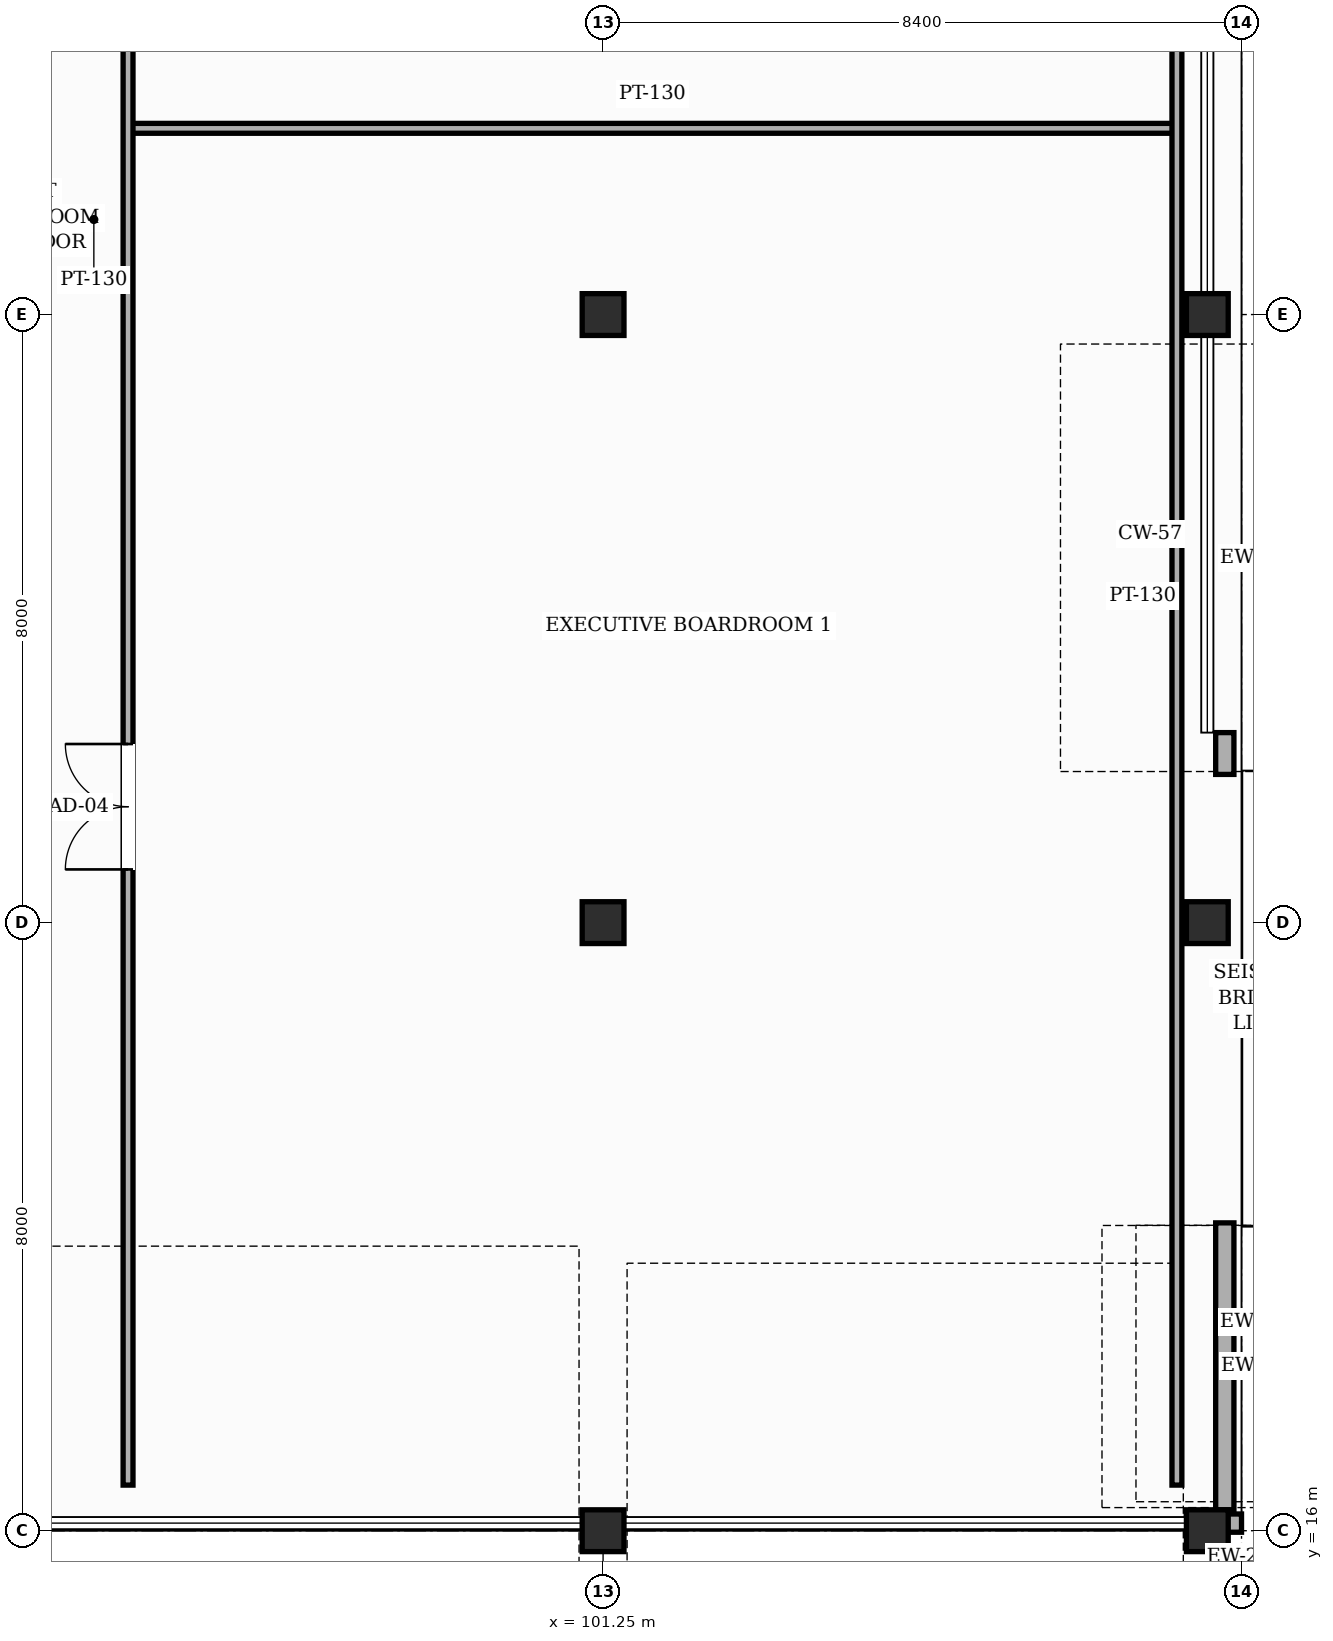
"""IFC4 building model, lengths in metres.
Left out: names, types, materials, properties, quantities, classifications, styles, units other than length and angle.
Written with IfcOpenShell. Run it as: python <this file> out.ifc"""

import sys

from ifc_helpers import new_model, si_unit, direction, frame, frame_2d, origin, origin_2d, place, context, subcontext, project, spatial, rectangle, hollow_rectangle, extrude, element, fill, save


model = new_model("IFC4")
c1 = context("Model", 3, precision=1e-05, world=origin(), true_north=direction((0.0, 1.0)))
c2 = subcontext(c1, "Body", "Model", "MODEL_VIEW")
j1 = project(units=[si_unit("LENGTHUNIT", "METRE"), si_unit("PLANEANGLEUNIT", "RADIAN")], contexts=[c1])
p1 = place(None, origin())
s1 = spatial("IfcSite", under=j1, at=p1, CompositionType="ELEMENT")
p2 = place(p1, origin())
s2 = spatial("IfcBuilding", under=s1, at=p2, CompositionType="ELEMENT")
p3 = place(p2, frame((0.0, 0.0, 10.2)))
s3 = spatial("IfcBuildingStorey", under=s2, at=p3, CompositionType="ELEMENT", Elevation=10.2)
for number, where, z_axis, x_axis in (
    (1, (101.25, 16.0, 0.0), (0.0, 0.0, 1.0), (1.0, 0.0, 0.0)),
    (2, (101.25, 24.0, 0.0), (0.0, 0.0, 1.0), (1.0, 0.0, 0.0)),
    (3, (101.25, 32.0, 0.0), (0.0, 0.0, 1.0), (1.0, 0.0, 0.0)),
):
    element("IfcColumn", number, at=place(p3, frame(where, z_axis=z_axis, x_axis=x_axis)), inside=s3, PredefinedType="COLUMN", context=c2, shape_type="SweptSolid", body=[
        extrude(hollow_rectangle(XDim=0.55, YDim=0.55, WallThickness=0.022, InnerFilletRadius=0.022, OuterFilletRadius=0.044, at=origin_2d()), origin(), (0.0, 0.0, 1.0), 4.8),
    ])
for number, where, z_axis, x_axis in (
    (4, (109.2, 16.0, 0.0), (0.0, 0.0, 1.0), (1.0, 0.0, 0.0)),
    (5, (109.2, 24.0, 0.0), (0.0, 0.0, 1.0), (1.0, 0.0, 0.0)),
    (6, (109.2, 32.0, 0.0), (0.0, 0.0, 1.0), (1.0, 0.0, 0.0)),
):
    element("IfcColumn", number, at=place(p3, frame(where, z_axis=z_axis, x_axis=x_axis)), inside=s3, PredefinedType="COLUMN", context=c2, shape_type="SweptSolid", body=[
        extrude(hollow_rectangle(XDim=0.55, YDim=0.55, WallThickness=0.022, InnerFilletRadius=0.022, OuterFilletRadius=0.044, at=origin_2d()), origin(), (0.0, 0.0, 1.0), 4.56),
    ])
p4 = place(p3, frame((109.65, 16.1, 0.0), z_axis=(0.0, 0.0, 1.0), x_axis=(-1.0, 0.0, 0.0)))
e7 = element("IfcWall", 7, at=p4, inside=s3, PredefinedType="SOLIDWALL", context=c2, shape_type="SweptSolid", body=[
    extrude(rectangle(XDim=0.725, YDim=0.24, at=frame_2d((0.362, 0.0))), origin(), (0.0, 0.0, 1.0), 4.545),
])
p5 = place(p3, frame((109.43, 20.05, 0.0), z_axis=(0.0, 0.0, 1.0), x_axis=(0.0, -1.0, 0.0)))
e8 = element("IfcWall", 8, at=p5, inside=s3, PredefinedType="SOLIDWALL", context=c2, shape_type="SweptSolid", body=[
    extrude(rectangle(XDim=3.775, YDim=0.24, at=frame_2d((1.888, 0.0))), origin(), (0.0, 0.0, 1.0), 3.885),
])
p6 = place(p3, frame((109.43, 26.5, 0.0), z_axis=(0.0, 0.0, 1.0), x_axis=(0.0, -1.0, 0.0)))
e9 = element("IfcWall", 9, at=p6, inside=s3, PredefinedType="SOLIDWALL", context=c2, shape_type="SweptSolid", body=[
    extrude(rectangle(XDim=0.55, YDim=0.24, at=frame_2d((0.275, 0.0))), origin(), (0.0, 0.0, 1.0), 3.885),
])
p7 = place(p3, frame((95.0, 34.45, 0.0), z_axis=(0.0, 0.0, 1.0), x_axis=(1.0, 0.0, 0.0)))
e10 = element("IfcWall", 10, at=p7, inside=s3, PredefinedType="PARTITIONING", context=c2, shape_type="SweptSolid", body=[
    extrude(rectangle(XDim=13.8, YDim=0.13, at=frame_2d((6.9, 0.0))), origin(), (0.0, 0.0, 1.0), 4.545),
])
p8 = place(p3, frame((95.0, 16.6, 0.0), z_axis=(0.0, 0.0, 1.0), x_axis=(0.0, 1.0, 0.0)))
e11 = element("IfcWall", 11, at=p8, inside=s3, PredefinedType="PARTITIONING", context=c2, shape_type="SweptSolid", body=[
    extrude(rectangle(XDim=35.7, YDim=0.13, at=frame_2d((17.85, 0.0))), origin(), (0.0, 0.0, 1.0), 4.545),
])
p9 = place(p8, frame((8.1, 0.0, 0.0)))
e12 = element("IfcOpeningElement", 12, at=p9, cuts=e11, PredefinedType="OPENING", context=c2, shape_type="SweptSolid", body=[
    extrude(rectangle(XDim=1.65, YDim=2.35, at=frame_2d((0.825, 1.175))), frame((0.0, 0.075, 0.0), z_axis=(0.0, -1.0, 0.0), x_axis=(1.0, 0.0, 0.0)), (0.0, 0.0, 1.0), 0.15),
])
p10 = place(p8, frame((26.025, 0.0, 0.0)))
e13 = element("IfcOpeningElement", 13, at=p10, cuts=e11, PredefinedType="OPENING", context=c2, shape_type="SweptSolid", body=[
    extrude(rectangle(XDim=1.5, YDim=2.3, at=frame_2d((0.75, 1.15))), frame((0.0, 0.075, 0.0), z_axis=(0.0, -1.0, 0.0), x_axis=(1.0, 0.0, 0.0)), (0.0, 0.0, 1.0), 0.15),
])
p11 = place(p3, frame((108.8, 16.6, 0.0), z_axis=(0.0, 0.0, 1.0), x_axis=(0.0, 1.0, 0.0)))
e14 = element("IfcWall", 14, at=p11, inside=s3, PredefinedType="PARTITIONING", context=c2, shape_type="SweptSolid", body=[
    extrude(rectangle(XDim=35.7, YDim=0.13, at=frame_2d((17.85, 0.0))), origin(), (0.0, 0.0, 1.0), 4.545),
])
p12 = place(p9, origin())
e15 = element("IfcDoor", 15, at=p12, inside=s3, OperationType="DOUBLE_DOOR_SINGLE_SWING", PredefinedType="DOOR", context=c2, shape_type="SweptSolid", body=[
    extrude(rectangle(XDim=1.65, YDim=2.35, at=frame_2d((0.825, 1.175))), frame((0.0, 0.025, 0.0), z_axis=(0.0, -1.0, 0.0), x_axis=(1.0, 0.0, 0.0)), (0.0, 0.0, 1.0), 0.05),
])
fill(e12, e15)
save(model, sys.argv[1])
